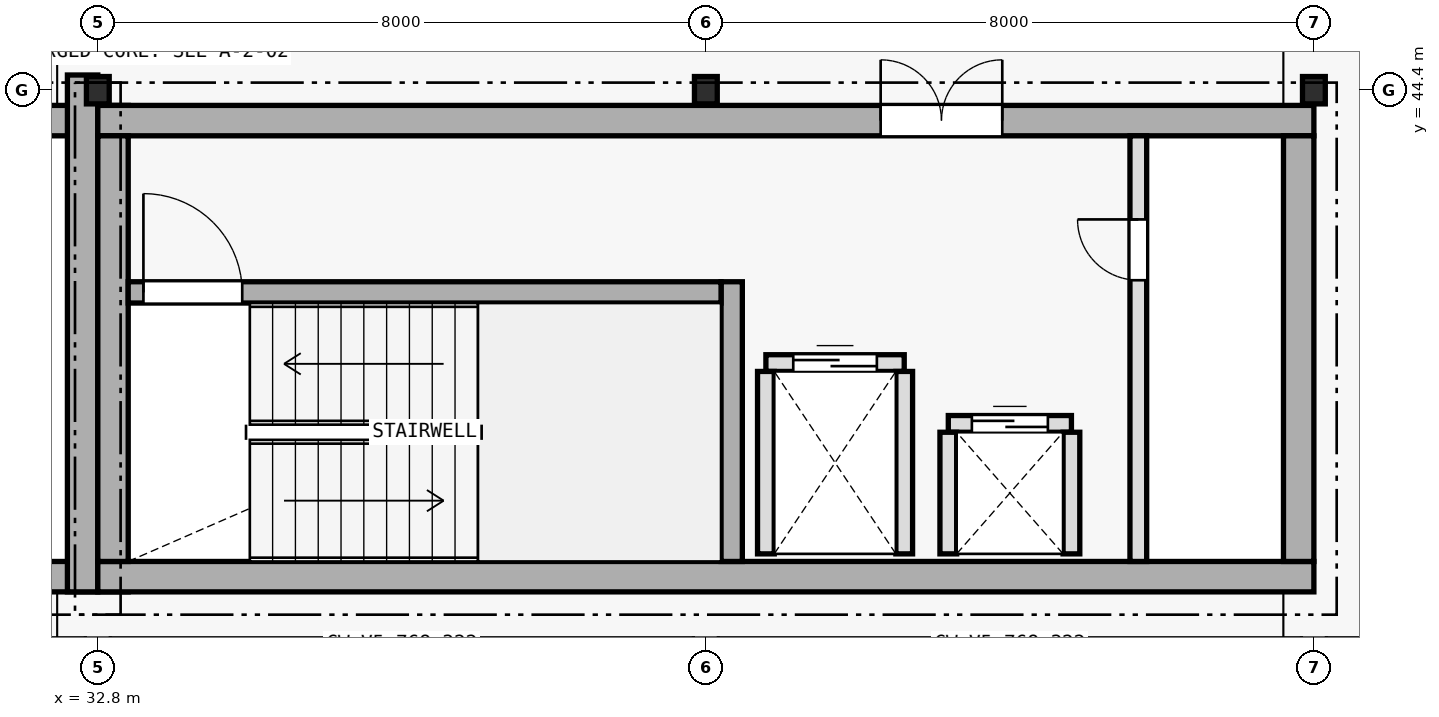
"""IFC4 building model, lengths in metres.
Left out: names, types, materials, properties, quantities, classifications, styles, units other than length and angle.
Written with IfcOpenShell. Run it as: python <this file> out.ifc"""

import sys

from ifc_helpers import new_model, si_unit, direction, frame, frame_2d, origin, origin_2d, place, context, subcontext, project, spatial, rectangle, i_section, extrude, element, fill, save


model = new_model("IFC4")
c1 = context("Model", 3, precision=1e-05, world=origin(), true_north=direction((0.0, 1.0)))
c2 = subcontext(c1, "Body", "Model", "MODEL_VIEW")
j1 = project(units=[si_unit("LENGTHUNIT", "METRE"), si_unit("PLANEANGLEUNIT", "RADIAN")], contexts=[c1])
p1 = place(None, origin())
s1 = spatial("IfcSite", under=j1, at=p1, CompositionType="ELEMENT")
p2 = place(p1, origin())
s2 = spatial("IfcBuilding", under=s1, at=p2, CompositionType="ELEMENT")
p3 = place(p2, frame((0.0, 0.0, 23.3)))
s3 = spatial("IfcBuildingStorey", under=s2, at=p3, CompositionType="ELEMENT", Elevation=23.3)
p4 = place(p3, frame((16.8, 38.0, 0.0), z_axis=(0.0, 0.0, 1.0), x_axis=(1.0, 0.0, 0.0)))
e1 = element("IfcWall", 1, at=p4, inside=s3, PredefinedType="SHEAR", context=c2, shape_type="SweptSolid", body=[
    extrude(rectangle(XDim=16.4, YDim=0.4, at=frame_2d((8.2, 0.0))), origin(), (0.0, 0.0, 1.0), 3.895),
])
p5 = place(p3, frame((16.8, 44.0, 0.0), z_axis=(0.0, 0.0, 1.0), x_axis=(1.0, 0.0, 0.0)))
e2 = element("IfcWall", 2, at=p5, inside=s3, PredefinedType="SHEAR", context=c2, shape_type="SweptSolid", body=[
    extrude(rectangle(XDim=16.4, YDim=0.4, at=frame_2d((8.2, 0.0))), origin(), (0.0, 0.0, 1.0), 3.895),
])
p6 = place(p5, frame((10.3, 0.0, 0.0)))
e3 = element("IfcOpeningElement", 3, at=p6, cuts=e2, PredefinedType="OPENING", context=c2, shape_type="SweptSolid", body=[
    extrude(rectangle(XDim=1.6, YDim=2.2, at=frame_2d((0.8, 1.1))), frame((0.0, 0.21, 0.0), z_axis=(0.0, -1.0, 0.0), x_axis=(1.0, 0.0, 0.0)), (0.0, 0.0, 1.0), 0.42),
])
p7 = place(p3, frame((32.6, 37.8, 0.0), z_axis=(0.0, 0.0, 1.0), x_axis=(0.0, 1.0, 0.0)))
e4 = element("IfcWall", 4, at=p7, inside=s3, PredefinedType="SHEAR", context=c2, shape_type="SweptSolid", body=[
    extrude(rectangle(XDim=6.8, YDim=0.4, at=frame_2d((3.4, 0.0))), origin(), (0.0, 0.0, 1.0), 3.895),
])
p8 = place(p3, frame((32.8, 38.0, 0.0), z_axis=(0.0, 0.0, 1.0), x_axis=(1.0, 0.0, 0.0)))
e5 = element("IfcWall", 5, at=p8, inside=s3, PredefinedType="SHEAR", context=c2, shape_type="SweptSolid", body=[
    extrude(rectangle(XDim=16.0, YDim=0.4, at=frame_2d((8.0, 0.0))), origin(), (0.0, 0.0, 1.0), 3.895),
])
p9 = place(p3, frame((32.8, 44.0, 0.0), z_axis=(0.0, 0.0, 1.0), x_axis=(1.0, 0.0, 0.0)))
e6 = element("IfcWall", 6, at=p9, inside=s3, PredefinedType="SHEAR", context=c2, shape_type="SweptSolid", body=[
    extrude(rectangle(XDim=16.0, YDim=0.4, at=frame_2d((8.0, 0.0))), origin(), (0.0, 0.0, 1.0), 3.895),
])
p10 = place(p9, frame((10.3, 0.0, 0.0)))
e7 = element("IfcOpeningElement", 7, at=p10, cuts=e6, PredefinedType="OPENING", context=c2, shape_type="SweptSolid", body=[
    extrude(rectangle(XDim=1.6, YDim=2.2, at=frame_2d((0.8, 1.1))), frame((0.0, 0.21, 0.0), z_axis=(0.0, -1.0, 0.0), x_axis=(1.0, 0.0, 0.0)), (0.0, 0.0, 1.0), 0.42),
])
for number, where, z_axis, x_axis in (
    (8, (33.0, 38.2, 0.0), (0.0, 0.0, 1.0), (0.0, 1.0, 0.0)),
    (9, (48.6, 38.2, 0.0), (0.0, 0.0, 1.0), (0.0, 1.0, 0.0)),
):
    element("IfcWall", number, at=place(p3, frame(where, z_axis=z_axis, x_axis=x_axis)), inside=s3, PredefinedType="SHEAR", context=c2, shape_type="SweptSolid", body=[
        extrude(rectangle(XDim=5.6, YDim=0.4, at=frame_2d((2.8, 0.0))), origin(), (0.0, 0.0, 1.0), 3.895),
    ])
p11 = place(p3, frame((41.14, 38.2, 0.0), z_axis=(0.0, 0.0, 1.0), x_axis=(0.0, 1.0, 0.0)))
e10 = element("IfcWall", 10, at=p11, inside=s3, PredefinedType="SHEAR", context=c2, shape_type="SweptSolid", body=[
    extrude(rectangle(XDim=3.68, YDim=0.28, at=frame_2d((1.84, 0.0))), origin(), (0.0, 0.0, 1.0), 3.895),
])
p12 = place(p3, frame((33.2, 41.74, 0.0), z_axis=(0.0, 0.0, 1.0), x_axis=(1.0, 0.0, 0.0)))
e11 = element("IfcWall", 11, at=p12, inside=s3, PredefinedType="SHEAR", context=c2, shape_type="SweptSolid", body=[
    extrude(rectangle(XDim=7.8, YDim=0.28, at=frame_2d((3.9, 0.0))), origin(), (0.0, 0.0, 1.0), 3.895),
])
p13 = place(p12, frame((0.2, 0.0, 0.0)))
e12 = element("IfcOpeningElement", 12, at=p13, cuts=e11, PredefinedType="OPENING", context=c2, shape_type="SweptSolid", body=[
    extrude(rectangle(XDim=1.3, YDim=2.2, at=frame_2d((0.65, 1.1))), frame((0.0, 0.15, 0.0), z_axis=(0.0, -1.0, 0.0), x_axis=(1.0, 0.0, 0.0)), (0.0, 0.0, 1.0), 0.3),
])
for number, where, z_axis, x_axis in (
    (13, (32.8, 44.4, 0.0), (0.0, 0.0, 1.0), (1.0, 0.0, 0.0)),
    (14, (40.8, 44.4, 0.0), (0.0, 0.0, 1.0), (1.0, 0.0, 0.0)),
    (15, (48.8, 44.4, 0.0), (0.0, 0.0, 1.0), (1.0, 0.0, 0.0)),
):
    element("IfcColumn", number, at=place(p3, frame(where, z_axis=z_axis, x_axis=x_axis)), inside=s3, PredefinedType="COLUMN", context=c2, shape_type="SweptSolid", body=[
        extrude(i_section(OverallWidth=0.3, OverallDepth=0.36, WebThickness=0.012, FlangeThickness=0.022, FilletRadius=0.027, at=origin_2d()), origin(), (0.0, 0.0, 1.0), 3.9),
    ])
p14 = place(p3, frame((41.59, 40.81, 0.0), z_axis=(0.0, 0.0, 1.0), x_axis=(1.0, 0.0, 0.0)))
e16 = element("IfcWall", 16, at=p14, inside=s3, PredefinedType="PLUMBINGWALL", context=c2, shape_type="SweptSolid", body=[
    extrude(rectangle(XDim=1.82, YDim=0.22, at=frame_2d((0.91, 0.0))), origin(), (0.0, 0.0, 1.0), 3.68),
])
p15 = place(p14, frame((0.36, 0.0, 0.0)))
e17 = element("IfcOpeningElement", 17, at=p15, cuts=e16, PredefinedType="OPENING", context=c2, shape_type="SweptSolid", body=[
    extrude(rectangle(XDim=1.1, YDim=2.2, at=frame_2d((0.55, 1.1))), frame((0.0, 0.12, 0.0), z_axis=(0.0, -1.0, 0.0), x_axis=(1.0, 0.0, 0.0)), (0.0, 0.0, 1.0), 0.24),
])
for number, where, z_axis, x_axis in (
    (18, (41.59, 38.3, 0.0), (0.0, 0.0, 1.0), (0.0, 1.0, 0.0)),
    (19, (43.41, 38.3, 0.0), (0.0, 0.0, 1.0), (0.0, 1.0, 0.0)),
):
    element("IfcWall", number, at=place(p3, frame(where, z_axis=z_axis, x_axis=x_axis)), inside=s3, PredefinedType="PLUMBINGWALL", context=c2, shape_type="SweptSolid", body=[
        extrude(rectangle(XDim=2.4, YDim=0.22, at=frame_2d((1.2, 0.0))), origin(), (0.0, 0.0, 1.0), 3.68),
    ])
p16 = place(p3, frame((43.99, 40.01, 0.0), z_axis=(0.0, 0.0, 1.0), x_axis=(1.0, 0.0, 0.0)))
e20 = element("IfcWall", 20, at=p16, inside=s3, PredefinedType="PLUMBINGWALL", context=c2, shape_type="SweptSolid", body=[
    extrude(rectangle(XDim=1.62, YDim=0.22, at=frame_2d((0.81, 0.0))), origin(), (0.0, 0.0, 1.0), 3.68),
])
p17 = place(p16, frame((0.31, 0.0, 0.0)))
e21 = element("IfcOpeningElement", 21, at=p17, cuts=e20, PredefinedType="OPENING", context=c2, shape_type="SweptSolid", body=[
    extrude(rectangle(XDim=1.0, YDim=2.2, at=frame_2d((0.5, 1.1))), frame((0.0, 0.12, 0.0), z_axis=(0.0, -1.0, 0.0), x_axis=(1.0, 0.0, 0.0)), (0.0, 0.0, 1.0), 0.24),
])
for number, where, z_axis, x_axis in (
    (22, (43.99, 38.3, 0.0), (0.0, 0.0, 1.0), (0.0, 1.0, 0.0)),
    (23, (45.61, 38.3, 0.0), (0.0, 0.0, 1.0), (0.0, 1.0, 0.0)),
):
    element("IfcWall", number, at=place(p3, frame(where, z_axis=z_axis, x_axis=x_axis)), inside=s3, PredefinedType="PLUMBINGWALL", context=c2, shape_type="SweptSolid", body=[
        extrude(rectangle(XDim=1.6, YDim=0.22, at=frame_2d((0.8, 0.0))), origin(), (0.0, 0.0, 1.0), 3.68),
    ])
p18 = place(p3, frame((46.49, 38.2, 0.0), z_axis=(0.0, 0.0, 1.0), x_axis=(0.0, 1.0, 0.0)))
e24 = element("IfcWall", 24, at=p18, inside=s3, PredefinedType="PLUMBINGWALL", context=c2, shape_type="SweptSolid", body=[
    extrude(rectangle(XDim=5.6, YDim=0.22, at=frame_2d((2.8, 0.0))), origin(), (0.0, 0.0, 1.0), 3.68),
])
p19 = place(p18, frame((3.7, 0.0, 0.0)))
e25 = element("IfcOpeningElement", 25, at=p19, cuts=e24, PredefinedType="OPENING", context=c2, shape_type="SweptSolid", body=[
    extrude(rectangle(XDim=0.8, YDim=2.1, at=frame_2d((0.4, 1.05))), frame((0.0, 0.12, 0.0), z_axis=(0.0, -1.0, 0.0), x_axis=(1.0, 0.0, 0.0)), (0.0, 0.0, 1.0), 0.24),
])
p20 = place(p13, origin())
e26 = element("IfcDoor", 26, at=p20, inside=s3, OperationType="SINGLE_SWING_LEFT", PredefinedType="DOOR", context=c2, shape_type="SweptSolid", body=[
    extrude(rectangle(XDim=1.3, YDim=2.2, at=frame_2d((0.65, 1.1))), frame((0.0, 0.025, 0.0), z_axis=(0.0, -1.0, 0.0), x_axis=(1.0, 0.0, 0.0)), (0.0, 0.0, 1.0), 0.05),
])
fill(e12, e26)
p21 = place(p15, origin())
e27 = element("IfcDoor", 27, at=p21, inside=s3, OperationType="DOUBLE_DOOR_SLIDING", PredefinedType="DOOR", context=c2, shape_type="SweptSolid", body=[
    extrude(rectangle(XDim=1.1, YDim=2.2, at=frame_2d((0.55, 1.1))), frame((0.0, 0.025, 0.0), z_axis=(0.0, -1.0, 0.0), x_axis=(1.0, 0.0, 0.0)), (0.0, 0.0, 1.0), 0.05),
])
fill(e17, e27)
p22 = place(p17, origin())
e28 = element("IfcDoor", 28, at=p22, inside=s3, OperationType="DOUBLE_DOOR_SLIDING", PredefinedType="DOOR", context=c2, shape_type="SweptSolid", body=[
    extrude(rectangle(XDim=1.0, YDim=2.2, at=frame_2d((0.5, 1.1))), frame((0.0, 0.025, 0.0), z_axis=(0.0, -1.0, 0.0), x_axis=(1.0, 0.0, 0.0)), (0.0, 0.0, 1.0), 0.05),
])
fill(e21, e28)
p23 = place(p19, origin())
e29 = element("IfcDoor", 29, at=p23, inside=s3, OperationType="SINGLE_SWING_RIGHT", PredefinedType="DOOR", context=c2, shape_type="SweptSolid", body=[
    extrude(rectangle(XDim=0.8, YDim=2.1, at=frame_2d((0.4, 1.05))), frame((0.0, 0.025, 0.0), z_axis=(0.0, -1.0, 0.0), x_axis=(1.0, 0.0, 0.0)), (0.0, 0.0, 1.0), 0.05),
])
fill(e25, e29)
p24 = place(p10, origin())
e30 = element("IfcDoor", 30, at=p24, inside=s3, OperationType="DOUBLE_DOOR_SINGLE_SWING", PredefinedType="DOOR", context=c2, shape_type="SweptSolid", body=[
    extrude(rectangle(XDim=1.6, YDim=2.2, at=frame_2d((0.8, 1.1))), frame((0.0, 0.025, 0.0), z_axis=(0.0, -1.0, 0.0), x_axis=(1.0, 0.0, 0.0)), (0.0, 0.0, 1.0), 0.05),
])
fill(e7, e30)
save(model, sys.argv[1])
